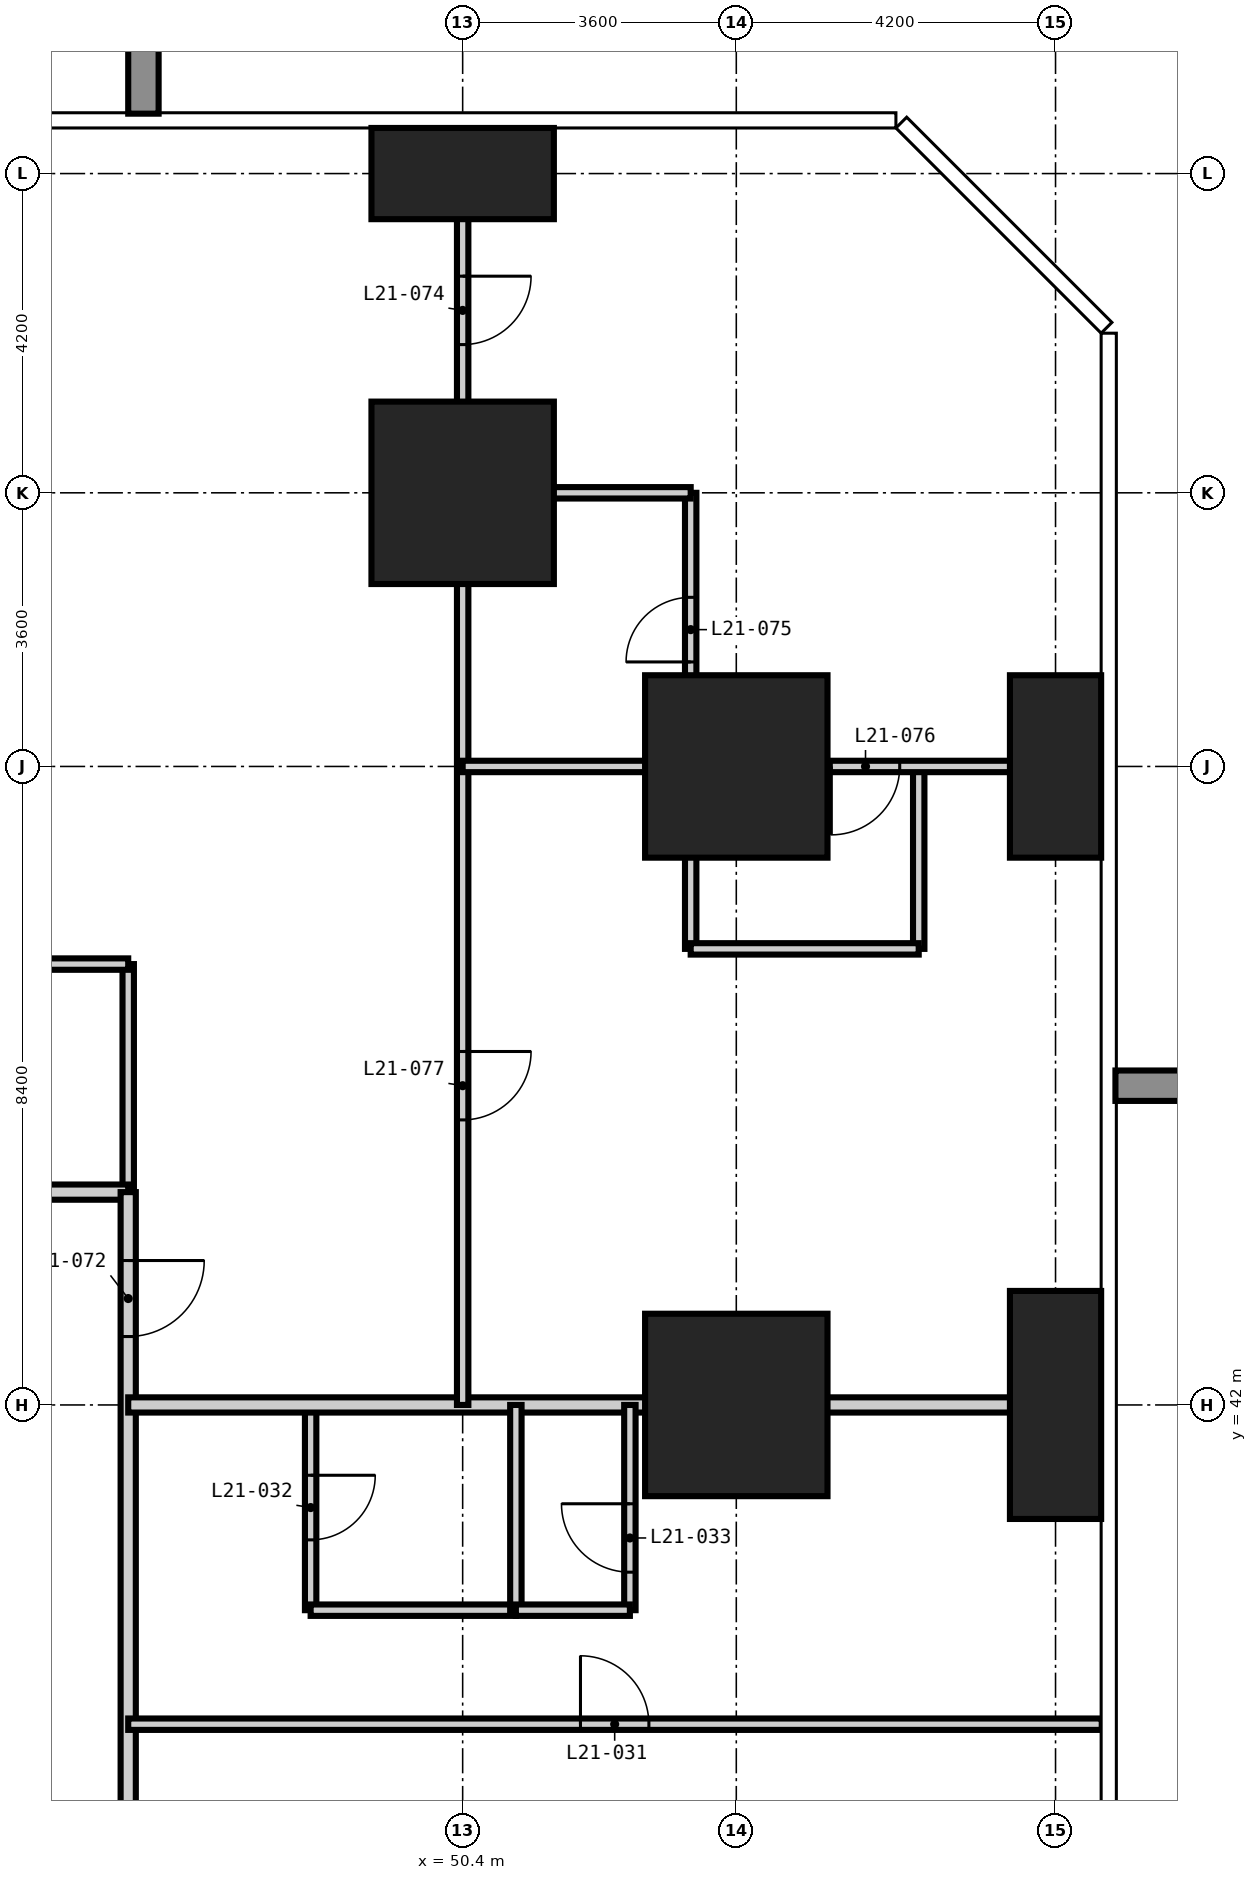
"""IFC4 building model, lengths in metres.
Left out: names, types, materials, properties, quantities, classifications, styles, units other than length and angle.
Written with IfcOpenShell. Run it as: python <this file> out.ifc"""

import sys

from ifc_helpers import new_model, si_unit, direction, frame, frame_2d, origin, origin_2d, place, context, subcontext, project, spatial, rectangle, extrude, element, fill, save


model = new_model("IFC4")
c1 = context("Model", 3, precision=1e-05, world=origin(), true_north=direction((0.0, 1.0)))
c2 = subcontext(c1, "Body", "Model", "MODEL_VIEW")
j1 = project(units=[si_unit("LENGTHUNIT", "METRE"), si_unit("PLANEANGLEUNIT", "RADIAN")], contexts=[c1])
p1 = place(None, origin())
s1 = spatial("IfcSite", under=j1, at=p1, CompositionType="ELEMENT")
p2 = place(p1, origin())
s2 = spatial("IfcBuilding", under=s1, at=p2, CompositionType="ELEMENT")
p3 = place(p2, frame((0.0, 0.0, 84.6)))
s3 = spatial("IfcBuildingStorey", under=s2, at=p3, CompositionType="ELEMENT", Elevation=84.6)
p4 = place(p3, frame((50.4, 54.0, -0.35), z_axis=(0.0, 0.0, 1.0), x_axis=(1.0, 0.0, 0.0)))
e1 = element("IfcColumn", 1, at=p4, inside=s3, PredefinedType="COLUMN", context=c2, shape_type="SweptSolid", body=[
    extrude(rectangle(XDim=2.4, YDim=2.4, at=origin_2d()), origin(), (0.0, 0.0, 1.0), 3.55),
])
p5 = place(p3, frame((50.4, 58.2, -0.35), z_axis=(0.0, 0.0, 1.0), x_axis=(1.0, 0.0, 0.0)))
e2 = element("IfcColumn", 2, at=p5, inside=s3, PredefinedType="COLUMN", context=c2, shape_type="SweptSolid", body=[
    extrude(rectangle(XDim=2.4, YDim=1.2, at=origin_2d()), origin(), (0.0, 0.0, 1.0), 3.55),
])
for number, where, z_axis, x_axis in (
    (3, (54.0, 42.0, -0.35), (0.0, 0.0, 1.0), (1.0, 0.0, 0.0)),
    (4, (54.0, 50.4, -0.35), (0.0, 0.0, 1.0), (1.0, 0.0, 0.0)),
):
    element("IfcColumn", number, at=place(p3, frame(where, z_axis=z_axis, x_axis=x_axis)), inside=s3, PredefinedType="COLUMN", context=c2, shape_type="SweptSolid", body=[
        extrude(rectangle(XDim=2.4, YDim=2.4, at=origin_2d()), origin(), (0.0, 0.0, 1.0), 3.55),
    ])
p6 = place(p3, frame((58.2, 42.0, -0.35), z_axis=(0.0, 0.0, 1.0), x_axis=(1.0, 0.0, 0.0)))
e5 = element("IfcColumn", 5, at=p6, inside=s3, PredefinedType="COLUMN", context=c2, shape_type="SweptSolid", body=[
    extrude(rectangle(XDim=1.2, YDim=3.0, at=origin_2d()), origin(), (0.0, 0.0, 1.0), 3.55),
])
p7 = place(p3, frame((58.2, 50.4, -0.35), z_axis=(0.0, 0.0, 1.0), x_axis=(1.0, 0.0, 0.0)))
e6 = element("IfcColumn", 6, at=p7, inside=s3, PredefinedType="COLUMN", context=c2, shape_type="SweptSolid", body=[
    extrude(rectangle(XDim=1.2, YDim=2.4, at=origin_2d()), origin(), (0.0, 0.0, 1.0), 3.55),
])
p8 = place(p3, frame((46.0, 44.8, 0.0), z_axis=(0.0, 0.0, 1.0), x_axis=(0.0, 1.0, 0.0)))
e7 = element("IfcWall", 7, at=p8, inside=s3, PredefinedType="PARTITIONING", context=c2, shape_type="SweptSolid", body=[
    extrude(rectangle(XDim=3.0, YDim=0.15, at=frame_2d((1.5, 0.0))), origin(), (0.0, 0.0, 1.0), 3.2),
])
p9 = place(p3, frame((48.4, 39.3, 0.0), z_axis=(0.0, 0.0, 1.0), x_axis=(0.0, 1.0, 0.0)))
e8 = element("IfcWall", 8, at=p9, inside=s3, PredefinedType="PARTITIONING", context=c2, shape_type="SweptSolid", body=[
    extrude(rectangle(XDim=2.7, YDim=0.15, at=frame_2d((1.35, 0.0))), origin(), (0.0, 0.0, 1.0), 3.2),
])
p10 = place(p9, frame((0.925, 0.0, 0.0)))
e9 = element("IfcOpeningElement", 9, at=p10, cuts=e8, PredefinedType="OPENING", context=c2, shape_type="SweptSolid", body=[
    extrude(rectangle(XDim=0.85, YDim=2.1, at=frame_2d((0.425, 1.05))), frame((0.0, 0.085, 0.0), z_axis=(0.0, -1.0, 0.0), x_axis=(1.0, 0.0, 0.0)), (0.0, 0.0, 1.0), 0.17),
])
p11 = place(p3, frame((53.4, 50.4, 0.0), z_axis=(0.0, 0.0, 1.0), x_axis=(0.0, 1.0, 0.0)))
e10 = element("IfcWall", 10, at=p11, inside=s3, PredefinedType="PARTITIONING", context=c2, shape_type="SweptSolid", body=[
    extrude(rectangle(XDim=3.6, YDim=0.15, at=frame_2d((1.8, 0.0))), origin(), (0.0, 0.0, 1.0), 3.2),
])
p12 = place(p11, frame((1.375, 0.0, 0.0)))
e11 = element("IfcOpeningElement", 11, at=p12, cuts=e10, PredefinedType="OPENING", context=c2, shape_type="SweptSolid", body=[
    extrude(rectangle(XDim=0.85, YDim=2.1, at=frame_2d((0.425, 1.05))), frame((0.0, 0.085, 0.0), z_axis=(0.0, -1.0, 0.0), x_axis=(1.0, 0.0, 0.0)), (0.0, 0.0, 1.0), 0.17),
])
p13 = place(p3, frame((48.4, 39.3, 0.0), z_axis=(0.0, 0.0, 1.0), x_axis=(1.0, 0.0, 0.0)))
e12 = element("IfcWall", 12, at=p13, inside=s3, PredefinedType="PARTITIONING", context=c2, shape_type="SweptSolid", body=[
    extrude(rectangle(XDim=2.7, YDim=0.15, at=frame_2d((1.35, 0.0))), origin(), (0.0, 0.0, 1.0), 3.2),
])
p14 = place(p3, frame((42.0, 47.8, 0.0), z_axis=(0.0, 0.0, 1.0), x_axis=(1.0, 0.0, 0.0)))
e13 = element("IfcWall", 13, at=p14, inside=s3, PredefinedType="PARTITIONING", context=c2, shape_type="SweptSolid", body=[
    extrude(rectangle(XDim=4.0, YDim=0.15, at=frame_2d((2.0, 0.0))), origin(), (0.0, 0.0, 1.0), 3.2),
])
p15 = place(p14, frame((1.575, 0.0, 0.0)))
e14 = element("IfcOpeningElement", 14, at=p15, cuts=e13, PredefinedType="OPENING", context=c2, shape_type="SweptSolid", body=[
    extrude(rectangle(XDim=0.85, YDim=2.1, at=frame_2d((0.425, 1.05))), frame((0.0, 0.085, 0.0), z_axis=(0.0, -1.0, 0.0), x_axis=(1.0, 0.0, 0.0)), (0.0, 0.0, 1.0), 0.17),
])
p16 = place(p3, frame((50.4, 54.0, 0.0), z_axis=(0.0, 0.0, 1.0), x_axis=(1.0, 0.0, 0.0)))
e15 = element("IfcWall", 15, at=p16, inside=s3, PredefinedType="PARTITIONING", context=c2, shape_type="SweptSolid", body=[
    extrude(rectangle(XDim=3.0, YDim=0.15, at=frame_2d((1.5, 0.0))), origin(), (0.0, 0.0, 1.0), 3.2),
])
p17 = place(p3, frame((13.4, 44.8, 0.0), z_axis=(0.0, 0.0, 1.0), x_axis=(1.0, 0.0, 0.0)))
e16 = element("IfcWall", 16, at=p17, inside=s3, PredefinedType="PARTITIONING", context=c2, shape_type="SweptSolid", body=[
    extrude(rectangle(XDim=32.6, YDim=0.2, at=frame_2d((16.3, 0.0))), origin(), (0.0, 0.0, 1.0), 3.2),
])
p18 = place(p17, frame((7.1, 0.0, 0.0)))
e17 = element("IfcOpeningElement", 17, at=p18, cuts=e16, PredefinedType="OPENING", context=c2, shape_type="SweptSolid", body=[
    extrude(rectangle(XDim=1.0, YDim=2.2, at=frame_2d((0.5, 1.1))), frame((0.0, 0.11, 0.0), z_axis=(0.0, -1.0, 0.0), x_axis=(1.0, 0.0, 0.0)), (0.0, 0.0, 1.0), 0.22),
])
p19 = place(p17, frame((15.5, 0.0, 0.0)))
e18 = element("IfcOpeningElement", 18, at=p19, cuts=e16, PredefinedType="OPENING", context=c2, shape_type="SweptSolid", body=[
    extrude(rectangle(XDim=1.0, YDim=2.2, at=frame_2d((0.5, 1.1))), frame((0.0, 0.11, 0.0), z_axis=(0.0, -1.0, 0.0), x_axis=(1.0, 0.0, 0.0)), (0.0, 0.0, 1.0), 0.22),
])
p20 = place(p17, frame((23.9, 0.0, 0.0)))
e19 = element("IfcOpeningElement", 19, at=p20, cuts=e16, PredefinedType="OPENING", context=c2, shape_type="SweptSolid", body=[
    extrude(rectangle(XDim=1.0, YDim=2.2, at=frame_2d((0.5, 1.1))), frame((0.0, 0.11, 0.0), z_axis=(0.0, -1.0, 0.0), x_axis=(1.0, 0.0, 0.0)), (0.0, 0.0, 1.0), 0.22),
])
p21 = place(p3, frame((46.0, 44.8, 0.0), z_axis=(0.0, 0.0, 1.0), x_axis=(0.0, -1.0, 0.0)))
e20 = element("IfcWall", 20, at=p21, inside=s3, PredefinedType="PARTITIONING", context=c2, shape_type="SweptSolid", body=[
    extrude(rectangle(XDim=31.4, YDim=0.2, at=frame_2d((15.7, 0.0))), origin(), (0.0, 0.0, 1.0), 3.2),
])
p22 = place(p21, frame((21.2, 0.0, 0.0)))
e21 = element("IfcOpeningElement", 21, at=p22, cuts=e20, PredefinedType="OPENING", context=c2, shape_type="SweptSolid", body=[
    extrude(rectangle(XDim=1.0, YDim=2.2, at=frame_2d((0.5, 1.1))), frame((0.0, 0.11, 0.0), z_axis=(0.0, -1.0, 0.0), x_axis=(1.0, 0.0, 0.0)), (0.0, 0.0, 1.0), 0.22),
])
p23 = place(p21, frame((8.6, 0.0, 0.0)))
e22 = element("IfcOpeningElement", 22, at=p23, cuts=e20, PredefinedType="OPENING", context=c2, shape_type="SweptSolid", body=[
    extrude(rectangle(XDim=1.0, YDim=2.2, at=frame_2d((0.5, 1.1))), frame((0.0, 0.11, 0.0), z_axis=(0.0, -1.0, 0.0), x_axis=(1.0, 0.0, 0.0)), (0.0, 0.0, 1.0), 0.22),
])
p24 = place(p21, frame((29.2, 0.0, 0.0)))
e23 = element("IfcOpeningElement", 23, at=p24, cuts=e20, PredefinedType="OPENING", context=c2, shape_type="SweptSolid", body=[
    extrude(rectangle(XDim=1.0, YDim=2.2, at=frame_2d((0.5, 1.1))), frame((0.0, 0.11, 0.0), z_axis=(0.0, -1.0, 0.0), x_axis=(1.0, 0.0, 0.0)), (0.0, 0.0, 1.0), 0.22),
])
p25 = place(p21, frame((0.9, 0.0, 0.0)))
e24 = element("IfcOpeningElement", 24, at=p25, cuts=e20, PredefinedType="OPENING", context=c2, shape_type="SweptSolid", body=[
    extrude(rectangle(XDim=1.0, YDim=2.2, at=frame_2d((0.5, 1.1))), frame((0.0, 0.11, 0.0), z_axis=(0.0, -1.0, 0.0), x_axis=(1.0, 0.0, 0.0)), (0.0, 0.0, 1.0), 0.22),
])
p26 = place(p3, frame((46.0, 42.0, 0.0), z_axis=(0.0, 0.0, 1.0), x_axis=(1.0, 0.0, 0.0)))
e25 = element("IfcWall", 25, at=p26, inside=s3, PredefinedType="PARTITIONING", context=c2, shape_type="SweptSolid", body=[
    extrude(rectangle(XDim=12.808, YDim=0.2, at=frame_2d((6.404, 0.0))), origin(), (0.0, 0.0, 1.0), 3.2),
])
p27 = place(p3, frame((50.4, 42.0, 0.0), z_axis=(0.0, 0.0, 1.0), x_axis=(0.0, 1.0, 0.0)))
e26 = element("IfcWall", 26, at=p27, inside=s3, PredefinedType="PARTITIONING", context=c2, shape_type="SweptSolid", body=[
    extrude(rectangle(XDim=16.808, YDim=0.15, at=frame_2d((8.404, 0.0))), origin(), (0.0, 0.0, 1.0), 3.2),
])
p28 = place(p27, frame((13.95, 0.0, 0.0)))
e27 = element("IfcOpeningElement", 27, at=p28, cuts=e26, PredefinedType="OPENING", context=c2, shape_type="SweptSolid", body=[
    extrude(rectangle(XDim=0.9, YDim=2.1, at=frame_2d((0.45, 1.05))), frame((0.0, 0.085, 0.0), z_axis=(0.0, -1.0, 0.0), x_axis=(1.0, 0.0, 0.0)), (0.0, 0.0, 1.0), 0.17),
])
p29 = place(p27, frame((3.75, 0.0, 0.0)))
e28 = element("IfcOpeningElement", 28, at=p29, cuts=e26, PredefinedType="OPENING", context=c2, shape_type="SweptSolid", body=[
    extrude(rectangle(XDim=0.9, YDim=2.1, at=frame_2d((0.45, 1.05))), frame((0.0, 0.085, 0.0), z_axis=(0.0, -1.0, 0.0), x_axis=(1.0, 0.0, 0.0)), (0.0, 0.0, 1.0), 0.17),
])
p30 = place(p3, frame((51.1, 39.3, 0.0), z_axis=(0.0, 0.0, 1.0), x_axis=(0.0, 1.0, 0.0)))
e29 = element("IfcWall", 29, at=p30, inside=s3, PredefinedType="PARTITIONING", context=c2, shape_type="SweptSolid", body=[
    extrude(rectangle(XDim=2.7, YDim=0.15, at=frame_2d((1.35, 0.0))), origin(), (0.0, 0.0, 1.0), 3.2),
])
p31 = place(p3, frame((52.6, 39.3, 0.0), z_axis=(0.0, 0.0, 1.0), x_axis=(0.0, 1.0, 0.0)))
e30 = element("IfcWall", 30, at=p31, inside=s3, PredefinedType="PARTITIONING", context=c2, shape_type="SweptSolid", body=[
    extrude(rectangle(XDim=2.7, YDim=0.15, at=frame_2d((1.35, 0.0))), origin(), (0.0, 0.0, 1.0), 3.2),
])
p32 = place(p31, frame((0.5, 0.0, 0.0)))
e31 = element("IfcOpeningElement", 31, at=p32, cuts=e30, PredefinedType="OPENING", context=c2, shape_type="SweptSolid", body=[
    extrude(rectangle(XDim=0.9, YDim=2.1, at=frame_2d((0.45, 1.05))), frame((0.0, 0.085, 0.0), z_axis=(0.0, -1.0, 0.0), x_axis=(1.0, 0.0, 0.0)), (0.0, 0.0, 1.0), 0.17),
])
for number, where, z_axis, x_axis in (
    (32, (53.4, 48.0, 0.0), (0.0, 0.0, 1.0), (0.0, 1.0, 0.0)),
    (33, (56.4, 48.0, 0.0), (0.0, 0.0, 1.0), (0.0, 1.0, 0.0)),
):
    element("IfcWall", number, at=place(p3, frame(where, z_axis=z_axis, x_axis=x_axis)), inside=s3, PredefinedType="PARTITIONING", context=c2, shape_type="SweptSolid", body=[
        extrude(rectangle(XDim=2.4, YDim=0.15, at=frame_2d((1.2, 0.0))), origin(), (0.0, 0.0, 1.0), 3.2),
    ])
p33 = place(p3, frame((46.0, 37.8, 0.0), z_axis=(0.0, 0.0, 1.0), x_axis=(1.0, 0.0, 0.0)))
e34 = element("IfcWall", 34, at=p33, inside=s3, PredefinedType="PARTITIONING", context=c2, shape_type="SweptSolid", body=[
    extrude(rectangle(XDim=12.808, YDim=0.15, at=frame_2d((6.404, 0.0))), origin(), (0.0, 0.0, 1.0), 3.2),
])
p34 = place(p33, frame((5.95, 0.0, 0.0)))
e35 = element("IfcOpeningElement", 35, at=p34, cuts=e34, PredefinedType="OPENING", context=c2, shape_type="SweptSolid", body=[
    extrude(rectangle(XDim=0.9, YDim=2.1, at=frame_2d((0.45, 1.05))), frame((0.0, 0.085, 0.0), z_axis=(0.0, -1.0, 0.0), x_axis=(1.0, 0.0, 0.0)), (0.0, 0.0, 1.0), 0.17),
])
p35 = place(p3, frame((51.1, 39.3, 0.0), z_axis=(0.0, 0.0, 1.0), x_axis=(1.0, 0.0, 0.0)))
e36 = element("IfcWall", 36, at=p35, inside=s3, PredefinedType="PARTITIONING", context=c2, shape_type="SweptSolid", body=[
    extrude(rectangle(XDim=1.5, YDim=0.15, at=frame_2d((0.75, 0.0))), origin(), (0.0, 0.0, 1.0), 3.2),
])
p36 = place(p3, frame((53.4, 48.0, 0.0), z_axis=(0.0, 0.0, 1.0), x_axis=(1.0, 0.0, 0.0)))
e37 = element("IfcWall", 37, at=p36, inside=s3, PredefinedType="PARTITIONING", context=c2, shape_type="SweptSolid", body=[
    extrude(rectangle(XDim=3.0, YDim=0.15, at=frame_2d((1.5, 0.0))), origin(), (0.0, 0.0, 1.0), 3.2),
])
p37 = place(p3, frame((50.4, 50.4, 0.0), z_axis=(0.0, 0.0, 1.0), x_axis=(1.0, 0.0, 0.0)))
e38 = element("IfcWall", 38, at=p37, inside=s3, PredefinedType="PARTITIONING", context=c2, shape_type="SweptSolid", body=[
    extrude(rectangle(XDim=8.408, YDim=0.15, at=frame_2d((4.204, 0.0))), origin(), (0.0, 0.0, 1.0), 3.2),
])
p38 = place(p37, frame((4.85, 0.0, 0.0)))
e39 = element("IfcOpeningElement", 39, at=p38, cuts=e38, PredefinedType="OPENING", context=c2, shape_type="SweptSolid", body=[
    extrude(rectangle(XDim=0.9, YDim=2.1, at=frame_2d((0.45, 1.05))), frame((0.0, 0.085, 0.0), z_axis=(0.0, -1.0, 0.0), x_axis=(1.0, 0.0, 0.0)), (0.0, 0.0, 1.0), 0.17),
])
p39 = place(p34, origin())
e40 = element("IfcDoor", 40, at=p39, inside=s3, OperationType="SINGLE_SWING_LEFT", PredefinedType="DOOR", context=c2, shape_type="SweptSolid", body=[
    extrude(rectangle(XDim=0.9, YDim=2.1, at=frame_2d((0.45, 1.05))), frame((0.0, 0.025, 0.0), z_axis=(0.0, -1.0, 0.0), x_axis=(1.0, 0.0, 0.0)), (0.0, 0.0, 1.0), 0.05),
])
fill(e35, e40)
p40 = place(p10, frame((0.85, 0.0, 0.0), z_axis=(0.0, 0.0, 1.0), x_axis=(-1.0, 0.0, 0.0)))
e41 = element("IfcDoor", 41, at=p40, inside=s3, OperationType="SINGLE_SWING_LEFT", PredefinedType="DOOR", context=c2, shape_type="SweptSolid", body=[
    extrude(rectangle(XDim=0.85, YDim=2.1, at=frame_2d((0.425, 1.05))), frame((0.0, 0.025, 0.0), z_axis=(0.0, -1.0, 0.0), x_axis=(1.0, 0.0, 0.0)), (0.0, 0.0, 1.0), 0.05),
])
fill(e9, e41)
p41 = place(p32, origin())
e42 = element("IfcDoor", 42, at=p41, inside=s3, OperationType="SINGLE_SWING_RIGHT", PredefinedType="DOOR", context=c2, shape_type="SweptSolid", body=[
    extrude(rectangle(XDim=0.9, YDim=2.1, at=frame_2d((0.45, 1.05))), frame((0.0, 0.025, 0.0), z_axis=(0.0, -1.0, 0.0), x_axis=(1.0, 0.0, 0.0)), (0.0, 0.0, 1.0), 0.05),
])
fill(e31, e42)
p42 = place(p25, origin())
e43 = element("IfcDoor", 43, at=p42, inside=s3, OperationType="SINGLE_SWING_LEFT", PredefinedType="DOOR", context=c2, shape_type="SweptSolid", body=[
    extrude(rectangle(XDim=1.0, YDim=2.2, at=frame_2d((0.5, 1.1))), frame((0.0, 0.025, 0.0), z_axis=(0.0, -1.0, 0.0), x_axis=(1.0, 0.0, 0.0)), (0.0, 0.0, 1.0), 0.05),
])
fill(e24, e43)
p43 = place(p28, frame((0.9, 0.0, 0.0), z_axis=(0.0, 0.0, 1.0), x_axis=(-1.0, 0.0, 0.0)))
e44 = element("IfcDoor", 44, at=p43, inside=s3, OperationType="SINGLE_SWING_LEFT", PredefinedType="DOOR", context=c2, shape_type="SweptSolid", body=[
    extrude(rectangle(XDim=0.9, YDim=2.1, at=frame_2d((0.45, 1.05))), frame((0.0, 0.025, 0.0), z_axis=(0.0, -1.0, 0.0), x_axis=(1.0, 0.0, 0.0)), (0.0, 0.0, 1.0), 0.05),
])
fill(e27, e44)
p44 = place(p12, origin())
e45 = element("IfcDoor", 45, at=p44, inside=s3, OperationType="SINGLE_SWING_LEFT", PredefinedType="DOOR", context=c2, shape_type="SweptSolid", body=[
    extrude(rectangle(XDim=0.85, YDim=2.1, at=frame_2d((0.425, 1.05))), frame((0.0, 0.025, 0.0), z_axis=(0.0, -1.0, 0.0), x_axis=(1.0, 0.0, 0.0)), (0.0, 0.0, 1.0), 0.05),
])
fill(e11, e45)
p45 = place(p38, frame((0.9, 0.0, 0.0), z_axis=(0.0, 0.0, 1.0), x_axis=(-1.0, 0.0, 0.0)))
e46 = element("IfcDoor", 46, at=p45, inside=s3, OperationType="SINGLE_SWING_RIGHT", PredefinedType="DOOR", context=c2, shape_type="SweptSolid", body=[
    extrude(rectangle(XDim=0.9, YDim=2.1, at=frame_2d((0.45, 1.05))), frame((0.0, 0.025, 0.0), z_axis=(0.0, -1.0, 0.0), x_axis=(1.0, 0.0, 0.0)), (0.0, 0.0, 1.0), 0.05),
])
fill(e39, e46)
p46 = place(p29, frame((0.9, 0.0, 0.0), z_axis=(0.0, 0.0, 1.0), x_axis=(-1.0, 0.0, 0.0)))
e47 = element("IfcDoor", 47, at=p46, inside=s3, OperationType="SINGLE_SWING_LEFT", PredefinedType="DOOR", context=c2, shape_type="SweptSolid", body=[
    extrude(rectangle(XDim=0.9, YDim=2.1, at=frame_2d((0.45, 1.05))), frame((0.0, 0.025, 0.0), z_axis=(0.0, -1.0, 0.0), x_axis=(1.0, 0.0, 0.0)), (0.0, 0.0, 1.0), 0.05),
])
fill(e28, e47)
save(model, sys.argv[1])
